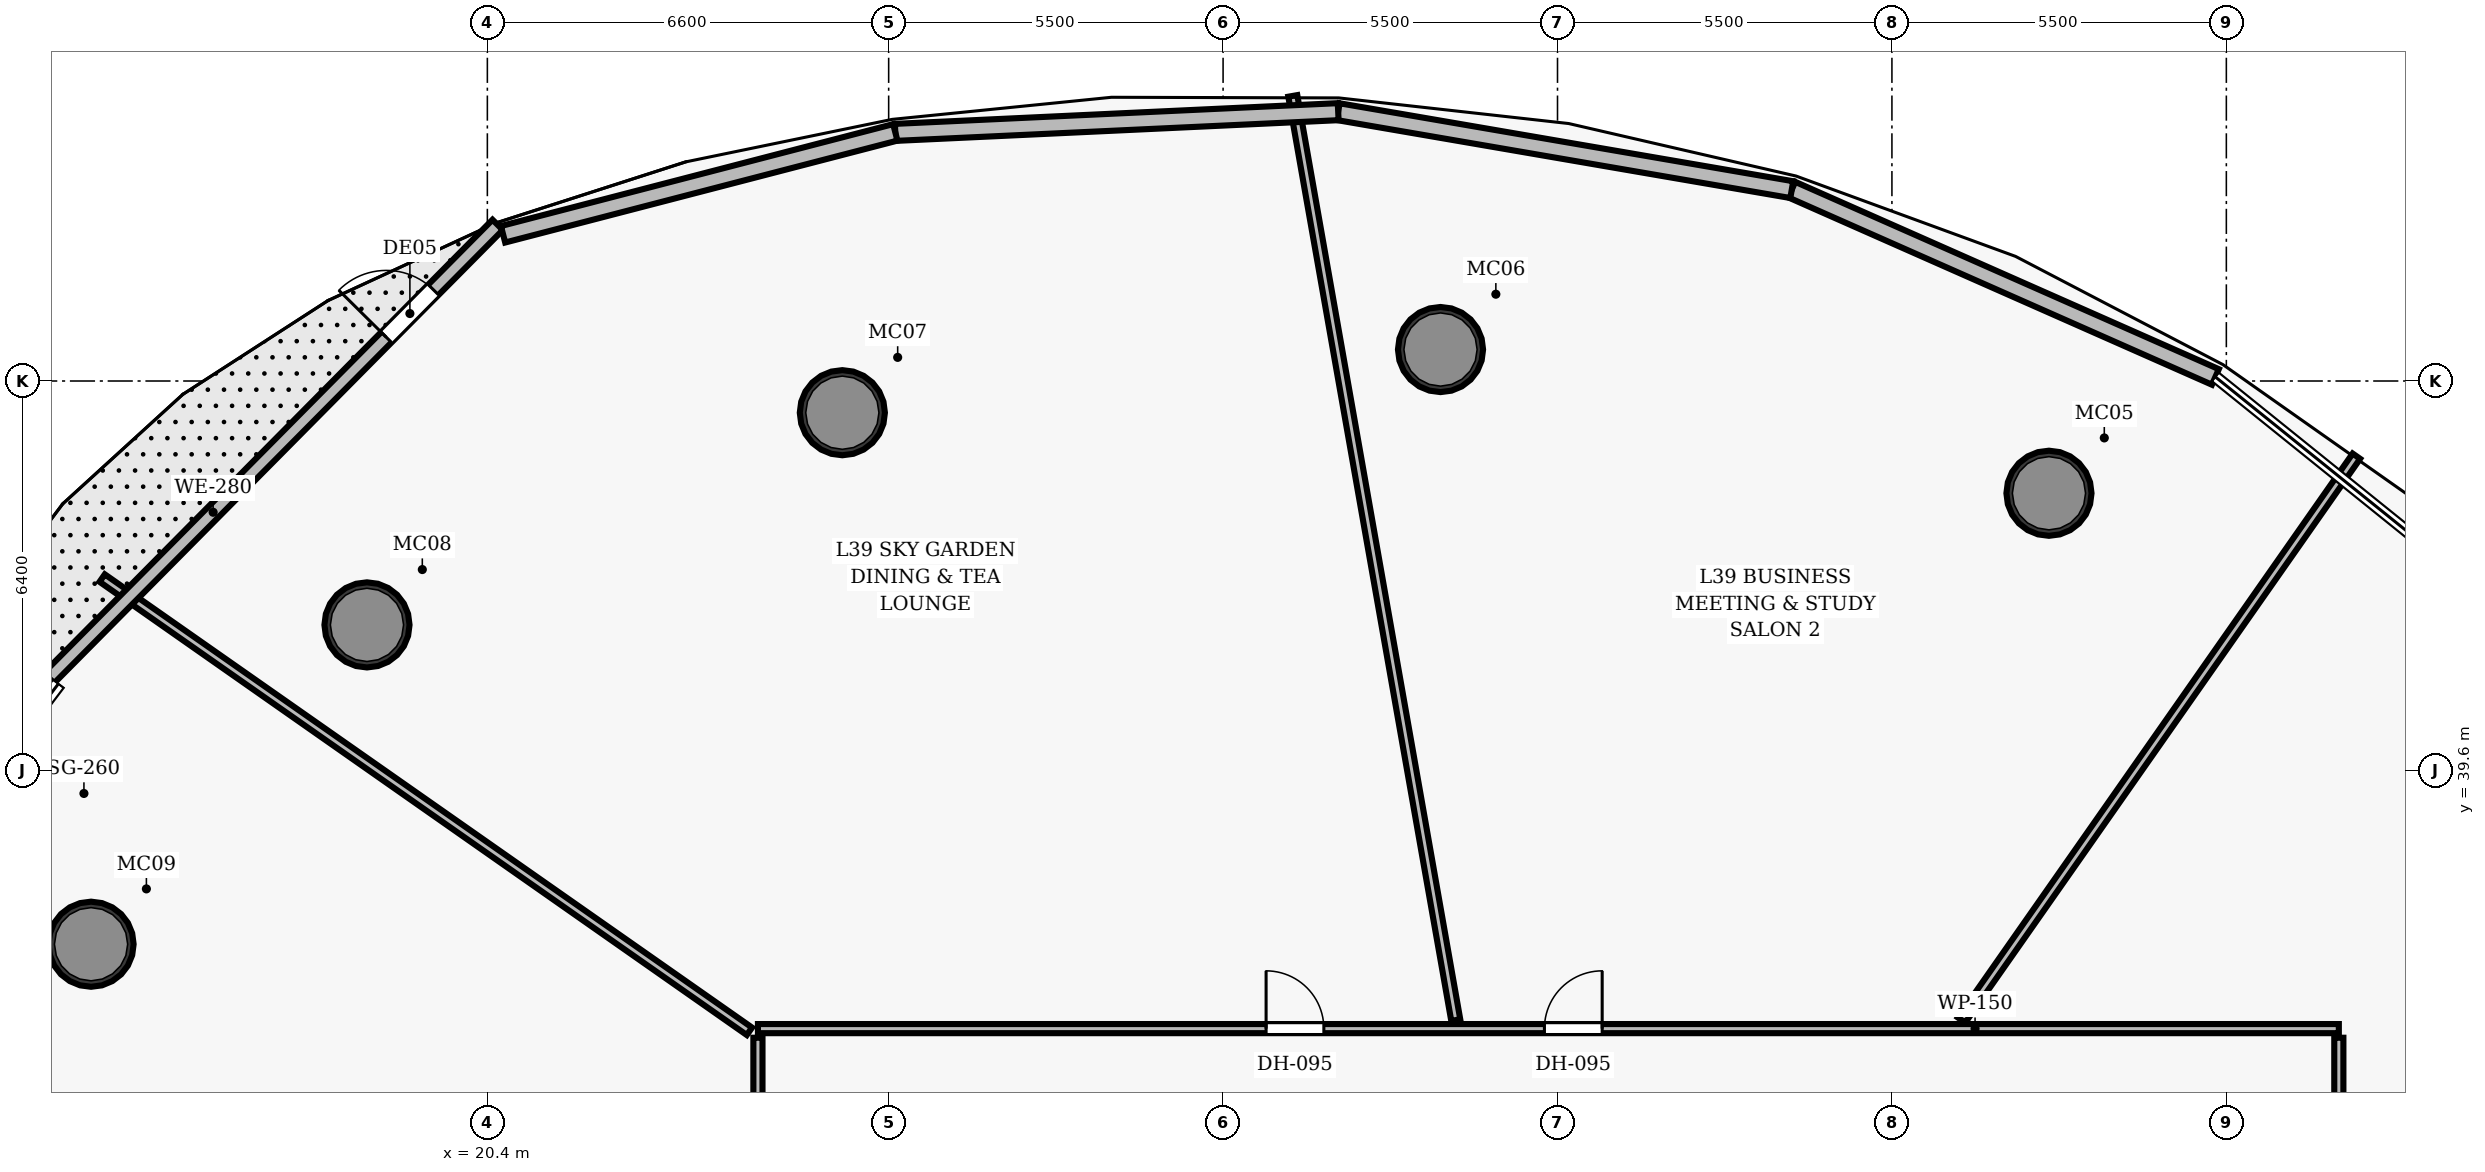
"""IFC4 building model, lengths in metres.
Left out: names, types, materials, properties, quantities, classifications, styles, units other than length and angle.
Written with IfcOpenShell. Run it as: python <this file> out.ifc"""

import sys

from ifc_helpers import new_model, si_unit, direction, frame, frame_2d, origin, origin_2d, place, context, subcontext, project, spatial, rectangle, hollow_circle, extrude, element, fill, save


model = new_model("IFC4")
c1 = context("Model", 3, precision=1e-05, world=origin(), true_north=direction((0.0, 1.0)))
c2 = subcontext(c1, "Body", "Model", "MODEL_VIEW")
j1 = project(units=[si_unit("LENGTHUNIT", "METRE"), si_unit("PLANEANGLEUNIT", "RADIAN")], contexts=[c1])
p1 = place(None, origin())
s1 = spatial("IfcSite", under=j1, at=p1, CompositionType="ELEMENT")
p2 = place(p1, origin())
s2 = spatial("IfcBuilding", under=s1, at=p2, CompositionType="ELEMENT")
p3 = place(p2, frame((0.0, 0.0, 155.3)))
s3 = spatial("IfcBuildingStorey", under=s2, at=p3, CompositionType="ELEMENT", Elevation=155.3)
for number, where, z_axis, x_axis in (
    (1, (46.083, 44.154, 0.0), (0.0, 0.0, 1.0), (1.0, 0.0, 0.0)),
    (2, (36.076, 46.517, 0.0), (0.0, 0.0, 1.0), (1.0, 0.0, 0.0)),
    (3, (26.238, 45.479, 0.0), (0.0, 0.0, 1.0), (1.0, 0.0, 0.0)),
    (4, (18.42, 41.989, 0.0), (0.0, 0.0, 1.0), (1.0, 0.0, 0.0)),
    (5, (13.882, 36.738, 0.0), (0.0, 0.0, 1.0), (1.0, 0.0, 0.0)),
):
    element("IfcColumn", number, at=place(p3, frame(where, z_axis=z_axis, x_axis=x_axis)), inside=s3, PredefinedType="COLUMN", context=c2, shape_type="SweptSolid", body=[
        extrude(hollow_circle(Radius=0.7, WallThickness=0.055, at=origin_2d()), origin(), (0.0, 0.0, 1.0), 3.5),
    ])
p4 = place(p3, frame((24.85, 35.35, 0.0), z_axis=(0.0, 0.0, 1.0), x_axis=(1.0, 0.0, 0.0)))
e6 = element("IfcWall", 6, at=p4, inside=s3, PredefinedType="PARTITIONING", context=c2, shape_type="SweptSolid", body=[
    extrude(rectangle(XDim=26.0, YDim=0.15, at=frame_2d((13.0, 0.0))), origin(), (0.0, 0.0, 1.0), 2.675),
])
p5 = place(p4, frame((12.935, 0.0, 0.0)))
e7 = element("IfcOpeningElement", 7, at=p5, cuts=e6, PredefinedType="OPENING", context=c2, shape_type="SweptSolid", body=[
    extrude(rectangle(XDim=0.95, YDim=2.15, at=frame_2d((0.475, 1.075))), frame((0.0, 0.085, 0.0), z_axis=(0.0, -1.0, 0.0), x_axis=(1.0, 0.0, 0.0)), (0.0, 0.0, 1.0), 0.17),
])
p6 = place(p4, frame((8.357, 0.0, 0.0)))
e8 = element("IfcOpeningElement", 8, at=p6, cuts=e6, PredefinedType="OPENING", context=c2, shape_type="SweptSolid", body=[
    extrude(rectangle(XDim=0.95, YDim=2.15, at=frame_2d((0.475, 1.075))), frame((0.0, 0.085, 0.0), z_axis=(0.0, -1.0, 0.0), x_axis=(1.0, 0.0, 0.0)), (0.0, 0.0, 1.0), 0.17),
])
p7 = place(p3, frame((24.85, 27.08, 0.0), z_axis=(0.0, 0.0, 1.0), x_axis=(0.0, 1.0, 0.0)))
e9 = element("IfcWall", 9, at=p7, inside=s3, PredefinedType="PARTITIONING", context=c2, shape_type="SweptSolid", body=[
    extrude(rectangle(XDim=8.12, YDim=0.15, at=frame_2d((4.06, 0.0))), origin(), (0.0, 0.0, 1.0), 2.675),
])
p8 = place(p7, frame((3.585, 0.0, 0.0)))
e10 = element("IfcOpeningElement", 10, at=p8, cuts=e9, PredefinedType="OPENING", context=c2, shape_type="SweptSolid", body=[
    extrude(rectangle(XDim=0.95, YDim=2.15, at=frame_2d((0.475, 1.075))), frame((0.0, 0.085, 0.0), z_axis=(0.0, -1.0, 0.0), x_axis=(1.0, 0.0, 0.0)), (0.0, 0.0, 1.0), 0.17),
])
p9 = place(p3, frame((50.85, 27.08, 0.0), z_axis=(0.0, 0.0, 1.0), x_axis=(0.0, 1.0, 0.0)))
e11 = element("IfcWall", 11, at=p9, inside=s3, PredefinedType="PARTITIONING", context=c2, shape_type="SweptSolid", body=[
    extrude(rectangle(XDim=8.12, YDim=0.15, at=frame_2d((4.06, 0.0))), origin(), (0.0, 0.0, 1.0), 2.675),
])
p10 = place(p9, frame((2.238, 0.0, 0.0)))
e12 = element("IfcOpeningElement", 12, at=p10, cuts=e11, PredefinedType="OPENING", context=c2, shape_type="SweptSolid", body=[
    extrude(rectangle(XDim=0.95, YDim=2.15, at=frame_2d((0.475, 1.075))), frame((0.0, 0.085, 0.0), z_axis=(0.0, -1.0, 0.0), x_axis=(1.0, 0.0, 0.0)), (0.0, 0.0, 1.0), 0.17),
])
p11 = place(p3, frame((44.645, 35.49, 0.0), z_axis=(0.0, 0.0, 1.0), x_axis=(0.573575227428, 0.819152890785, 0.0)))
e13 = element("IfcWall", 13, at=p11, inside=s3, PredefinedType="PARTITIONING", context=c2, shape_type="SweptSolid", body=[
    extrude(rectangle(XDim=11.321, YDim=0.15, at=frame_2d((5.661, 0.0))), origin(), (0.0, 0.0, 1.0), 2.675),
])
p12 = place(p3, frame((36.327, 35.49, 0.0), z_axis=(0.0, 0.0, 1.0), x_axis=(-0.173649964598, 0.984807437926, 0.0)))
e14 = element("IfcWall", 14, at=p12, inside=s3, PredefinedType="PARTITIONING", context=c2, shape_type="SweptSolid", body=[
    extrude(rectangle(XDim=15.433, YDim=0.15, at=frame_2d((7.716, 0.0))), origin(), (0.0, 0.0, 1.0), 2.675),
])
p13 = place(p3, frame((24.71, 35.306, 0.0), z_axis=(0.0, 0.0, 1.0), x_axis=(-0.819152473884, 0.573575822826, 0.0)))
e15 = element("IfcWall", 15, at=p13, inside=s3, PredefinedType="PARTITIONING", context=c2, shape_type="SweptSolid", body=[
    extrude(rectangle(XDim=12.995, YDim=0.15, at=frame_2d((6.497, 0.0))), origin(), (0.0, 0.0, 1.0), 2.675),
])
p14 = place(p3, frame((13.189, 41.115, 0.0), z_axis=(0.0, 0.0, 1.0), x_axis=(0.703641920354, 0.710554746603, 0.0)))
e16 = element("IfcWall", 16, at=p14, inside=s3, PredefinedType="SOLIDWALL", context=c2, shape_type="SweptSolid", body=[
    extrude(rectangle(XDim=10.489, YDim=0.24, at=frame_2d((5.245, 0.0))), origin(), (0.0, 0.0, 1.0), 2.45),
])
p15 = place(p14, frame((7.887, 0.0, 0.0)))
e17 = element("IfcOpeningElement", 17, at=p15, cuts=e16, PredefinedType="OPENING", context=c2, shape_type="SweptSolid", body=[
    extrude(rectangle(XDim=1.1, YDim=2.2, at=frame_2d((0.55, 1.1))), frame((0.0, 0.13, 0.0), z_axis=(0.0, -1.0, 0.0), x_axis=(1.0, 0.0, 0.0)), (0.0, 0.0, 1.0), 0.26),
])
p16 = place(p3, frame((41.853, 49.147, 0.0), z_axis=(0.0, 0.0, 1.0), x_axis=(0.914590963811, -0.404380228147, 0.0)))
e18 = element("IfcWall", 18, at=p16, inside=s3, PredefinedType="SOLIDWALL", context=c2, shape_type="SweptSolid", body=[
    extrude(rectangle(XDim=7.617, YDim=0.28, at=frame_2d((3.809, 0.0))), origin(), (0.0, 0.0, 1.0), 3.26),
])
p17 = place(p3, frame((34.393, 50.429, 0.0), z_axis=(0.0, 0.0, 1.0), x_axis=(0.985552340168, -0.16937114509, 0.0)))
e19 = element("IfcWall", 19, at=p17, inside=s3, PredefinedType="SOLIDWALL", context=c2, shape_type="SweptSolid", body=[
    extrude(rectangle(XDim=7.569, YDim=0.28, at=frame_2d((3.785, 0.0))), origin(), (0.0, 0.0, 1.0), 3.26),
])
p18 = place(p3, frame((27.109, 50.089, 0.0), z_axis=(0.0, 0.0, 1.0), x_axis=(0.998910234394, 0.0466727289, 0.0)))
e20 = element("IfcWall", 20, at=p18, inside=s3, PredefinedType="SOLIDWALL", context=c2, shape_type="SweptSolid", body=[
    extrude(rectangle(XDim=7.292, YDim=0.28, at=frame_2d((3.646, 0.0))), origin(), (0.0, 0.0, 1.0), 3.26),
])
p19 = place(p3, frame((20.658, 48.413, 0.0), z_axis=(0.0, 0.0, 1.0), x_axis=(0.967866916727, 0.251462982376, 0.0)))
e21 = element("IfcWall", 21, at=p19, inside=s3, PredefinedType="SOLIDWALL", context=c2, shape_type="SweptSolid", body=[
    extrude(rectangle(XDim=6.665, YDim=0.28, at=frame_2d((3.333, 0.0))), origin(), (0.0, 0.0, 1.0), 3.26),
])
p20 = place(p5, origin())
e22 = element("IfcDoor", 22, at=p20, inside=s3, OperationType="SINGLE_SWING_RIGHT", PredefinedType="DOOR", context=c2, shape_type="SweptSolid", body=[
    extrude(rectangle(XDim=0.95, YDim=2.15, at=frame_2d((0.475, 1.075))), frame((0.0, 0.025, 0.0), z_axis=(0.0, -1.0, 0.0), x_axis=(1.0, 0.0, 0.0)), (0.0, 0.0, 1.0), 0.05),
])
fill(e7, e22)
p21 = place(p6, origin())
e23 = element("IfcDoor", 23, at=p21, inside=s3, OperationType="SINGLE_SWING_LEFT", PredefinedType="DOOR", context=c2, shape_type="SweptSolid", body=[
    extrude(rectangle(XDim=0.95, YDim=2.15, at=frame_2d((0.475, 1.075))), frame((0.0, 0.025, 0.0), z_axis=(0.0, -1.0, 0.0), x_axis=(1.0, 0.0, 0.0)), (0.0, 0.0, 1.0), 0.05),
])
fill(e8, e23)
p22 = place(p15, origin())
e24 = element("IfcDoor", 24, at=p22, inside=s3, OperationType="SINGLE_SWING_LEFT", PredefinedType="DOOR", context=c2, shape_type="SweptSolid", body=[
    extrude(rectangle(XDim=1.1, YDim=2.2, at=frame_2d((0.55, 1.1))), frame((0.0, 0.025, 0.0), z_axis=(0.0, -1.0, 0.0), x_axis=(1.0, 0.0, 0.0)), (0.0, 0.0, 1.0), 0.05),
])
fill(e17, e24)
save(model, sys.argv[1])
